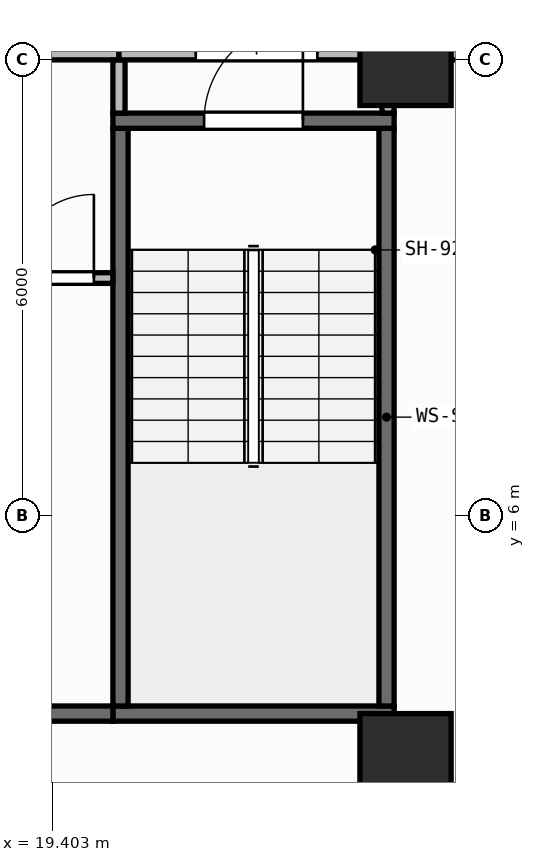
"""IFC4 building model, lengths in metres.
Left out: names, types, materials, properties, quantities, classifications, styles, units other than length and angle.
Written with IfcOpenShell. Run it as: python <this file> out.ifc"""

import sys

from ifc_helpers import new_model, si_unit, direction, frame, frame_2d, origin, origin_2d, place, context, subcontext, project, spatial, rectangle, extrude, element, fill, save


model = new_model("IFC4")
c1 = context("Model", 3, precision=1e-05, world=origin(), true_north=direction((0.0, 1.0)))
c2 = subcontext(c1, "Body", "Model", "MODEL_VIEW")
j1 = project(units=[si_unit("LENGTHUNIT", "METRE"), si_unit("PLANEANGLEUNIT", "RADIAN")], contexts=[c1])
p1 = place(None, origin())
s1 = spatial("IfcSite", under=j1, at=p1, CompositionType="ELEMENT")
p2 = place(p1, origin())
s2 = spatial("IfcBuilding", under=s1, at=p2, CompositionType="ELEMENT")
p3 = place(p2, frame((0.0, 0.0, 146.8)))
s3 = spatial("IfcBuildingStorey", under=s2, at=p3, CompositionType="ELEMENT", Elevation=146.8)
for number, where, z_axis, x_axis in (
    (1, (24.05, 2.8, 0.0), (0.0, 0.0, 1.0), (1.0, 0.0, 0.0)),
    (2, (24.05, 12.0, 0.0), (0.0, 0.0, 1.0), (1.0, 0.0, 0.0)),
):
    element("IfcColumn", number, at=place(p3, frame(where, z_axis=z_axis, x_axis=x_axis)), inside=s3, PredefinedType="COLUMN", context=c2, shape_type="SweptSolid", body=[
        extrude(rectangle(XDim=1.2, YDim=1.2, at=origin_2d()), origin(), (0.0, 0.0, 1.0), 3.95),
    ])
p4 = place(p3, frame((2.76, 0.173, 0.0), z_axis=(0.0, 0.0, 1.0), x_axis=(0.996857931723, 0.079210251617, 0.0)))
e3 = element("IfcWall", 3, at=p4, inside=s3, PredefinedType="STANDARD", context=c2, shape_type="SweptSolid", body=[
    extrude(rectangle(XDim=51.442, YDim=0.26, at=frame_2d((25.721, 0.0))), origin(), (0.0, 0.0, 1.0), 3.71),
])
p5 = place(p4, frame((24.521, 0.0, 0.9)))
e4 = element("IfcOpeningElement", 4, at=p5, cuts=e3, PredefinedType="OPENING", context=c2, shape_type="SweptSolid", body=[
    extrude(rectangle(XDim=2.4, YDim=1.65, at=frame_2d((1.2, 0.825))), frame((0.0, 0.14, 0.0), z_axis=(0.0, -1.0, 0.0), x_axis=(1.0, 0.0, 0.0)), (0.0, 0.0, 1.0), 0.28),
])
p6 = place(p3, frame((20.2, 3.4, 0.0), z_axis=(0.0, 0.0, 1.0), x_axis=(1.0, 0.0, 0.0)))
e5 = element("IfcWall", 5, at=p6, inside=s3, PredefinedType="SHEAR", context=c2, shape_type="SweptSolid", body=[
    extrude(rectangle(XDim=3.7, YDim=0.2, at=frame_2d((1.85, 0.0))), origin(), (0.0, 0.0, 1.0), 3.71),
])
for number, where, z_axis, x_axis in (
    (6, (20.3, 3.5, 0.0), (0.0, 0.0, 1.0), (0.0, 1.0, 0.0)),
    (7, (23.8, 3.5, 0.0), (0.0, 0.0, 1.0), (0.0, 1.0, 0.0)),
):
    element("IfcWall", number, at=place(p3, frame(where, z_axis=z_axis, x_axis=x_axis)), inside=s3, PredefinedType="SHEAR", context=c2, shape_type="SweptSolid", body=[
        extrude(rectangle(XDim=7.6, YDim=0.2, at=frame_2d((3.8, 0.0))), origin(), (0.0, 0.0, 1.0), 3.71),
    ])
p7 = place(p3, frame((20.2, 11.2, 0.0), z_axis=(0.0, 0.0, 1.0), x_axis=(1.0, 0.0, 0.0)))
e8 = element("IfcWall", 8, at=p7, inside=s3, PredefinedType="SHEAR", context=c2, shape_type="SweptSolid", body=[
    extrude(rectangle(XDim=3.7, YDim=0.2, at=frame_2d((1.85, 0.0))), origin(), (0.0, 0.0, 1.0), 3.71),
])
p8 = place(p7, frame((1.2, 0.0, 0.0)))
e9 = element("IfcOpeningElement", 9, at=p8, cuts=e8, PredefinedType="OPENING", context=c2, shape_type="SweptSolid", body=[
    extrude(rectangle(XDim=1.3, YDim=2.15, at=frame_2d((0.65, 1.075))), frame((0.0, 0.11, 0.0), z_axis=(0.0, -1.0, 0.0), x_axis=(1.0, 0.0, 0.0)), (0.0, 0.0, 1.0), 0.22),
])
p9 = place(p3, frame((6.5, 3.4, 0.0), z_axis=(0.0, 0.0, 1.0), x_axis=(1.0, 0.0, 0.0)))
e10 = element("IfcWall", 10, at=p9, inside=s3, PredefinedType="SHEAR", context=c2, shape_type="SweptSolid", body=[
    extrude(rectangle(XDim=13.7, YDim=0.2, at=frame_2d((6.85, 0.0))), origin(), (0.0, 0.0, 1.0), 3.71),
])
p10 = place(p3, frame((18.61, 9.13, 0.0), z_axis=(0.0, 0.0, 1.0), x_axis=(1.0, 0.0, 0.0)))
e11 = element("IfcWall", 11, at=p10, inside=s3, PredefinedType="PARTITIONING", context=c2, shape_type="SweptSolid", body=[
    extrude(rectangle(XDim=1.59, YDim=0.14, at=frame_2d((0.795, 0.0))), origin(), (0.0, 0.0, 1.0), 3.71),
])
p11 = place(p10, frame((0.24, 0.0, 0.0)))
e12 = element("IfcOpeningElement", 12, at=p11, cuts=e11, PredefinedType="OPENING", context=c2, shape_type="SweptSolid", body=[
    extrude(rectangle(XDim=1.1, YDim=2.1, at=frame_2d((0.55, 1.05))), frame((0.0, 0.08, 0.0), z_axis=(0.0, -1.0, 0.0), x_axis=(1.0, 0.0, 0.0)), (0.0, 0.0, 1.0), 0.16),
])
p12 = place(p3, frame((12.58, 12.08, 0.0), z_axis=(0.0, 0.0, 1.0), x_axis=(1.0, 0.0, 0.0)))
e13 = element("IfcWall", 13, at=p12, inside=s3, PredefinedType="PARTITIONING", context=c2, shape_type="SweptSolid", body=[
    extrude(rectangle(XDim=7.7, YDim=0.16, at=frame_2d((3.85, 0.0))), origin(), (0.0, 0.0, 1.0), 3.083),
])
p13 = place(p12, frame((3.05, 0.0, 0.0)))
e14 = element("IfcOpeningElement", 14, at=p13, cuts=e13, PredefinedType="OPENING", context=c2, shape_type="SweptSolid", body=[
    extrude(rectangle(XDim=1.6, YDim=2.05, at=frame_2d((0.8, 1.025))), frame((0.0, 0.09, 0.0), z_axis=(0.0, -1.0, 0.0), x_axis=(1.0, 0.0, 0.0)), (0.0, 0.0, 1.0), 0.18),
])
p14 = place(p3, frame((20.28, 11.3, 0.0), z_axis=(0.0, 0.0, 1.0), x_axis=(0.0, 1.0, 0.0)))
e15 = element("IfcWall", 15, at=p14, inside=s3, PredefinedType="PARTITIONING", context=c2, shape_type="SweptSolid", body=[
    extrude(rectangle(XDim=0.7, YDim=0.16, at=frame_2d((0.35, 0.0))), origin(), (0.0, 0.0, 1.0), 3.71),
])
p15 = place(p3, frame((20.28, 12.08, 0.0), z_axis=(0.0, 0.0, 1.0), x_axis=(1.0, 0.0, 0.0)))
e16 = element("IfcWall", 16, at=p15, inside=s3, PredefinedType="PARTITIONING", context=c2, shape_type="SweptSolid", body=[
    extrude(rectangle(XDim=3.62, YDim=0.16, at=frame_2d((1.81, 0.0))), origin(), (0.0, 0.0, 1.0), 3.083),
])
p16 = place(p15, frame((1.01, 0.0, 0.0)))
e17 = element("IfcOpeningElement", 17, at=p16, cuts=e16, PredefinedType="OPENING", context=c2, shape_type="SweptSolid", body=[
    extrude(rectangle(XDim=1.6, YDim=2.05, at=frame_2d((0.8, 1.025))), frame((0.0, 0.09, 0.0), z_axis=(0.0, -1.0, 0.0), x_axis=(1.0, 0.0, 0.0)), (0.0, 0.0, 1.0), 0.18),
])
p17 = place(p3, frame((23.82, 11.3, 0.0), z_axis=(0.0, 0.0, 1.0), x_axis=(0.0, 1.0, 0.0)))
e18 = element("IfcWall", 18, at=p17, inside=s3, PredefinedType="PARTITIONING", context=c2, shape_type="SweptSolid", body=[
    extrude(rectangle(XDim=0.7, YDim=0.16, at=frame_2d((0.35, 0.0))), origin(), (0.0, 0.0, 1.0), 3.71),
])
p18 = place(p3, frame((24.02, 12.08, 0.0), z_axis=(0.0, 0.0, 1.0), x_axis=(1.0, 0.0, 0.0)))
e19 = element("IfcWall", 19, at=p18, inside=s3, PredefinedType="PARTITIONING", context=c2, shape_type="SweptSolid", body=[
    extrude(rectangle(XDim=1.244, YDim=0.16, at=frame_2d((0.622, 0.0))), origin(), (0.0, 0.0, 1.0), 3.083),
])
p19 = place(p8, origin())
e20 = element("IfcDoor", 20, at=p19, inside=s3, OperationType="SINGLE_SWING_RIGHT", PredefinedType="DOOR", context=c2, shape_type="SweptSolid", body=[
    extrude(rectangle(XDim=1.3, YDim=2.15, at=frame_2d((0.65, 1.075))), frame((0.0, 0.025, 0.0), z_axis=(0.0, -1.0, 0.0), x_axis=(1.0, 0.0, 0.0)), (0.0, 0.0, 1.0), 0.05),
])
fill(e9, e20)
p20 = place(p11, origin())
e21 = element("IfcDoor", 21, at=p20, inside=s3, OperationType="SINGLE_SWING_RIGHT", PredefinedType="DOOR", context=c2, shape_type="SweptSolid", body=[
    extrude(rectangle(XDim=1.1, YDim=2.1, at=frame_2d((0.55, 1.05))), frame((0.0, 0.025, 0.0), z_axis=(0.0, -1.0, 0.0), x_axis=(1.0, 0.0, 0.0)), (0.0, 0.0, 1.0), 0.05),
])
fill(e12, e21)
p21 = place(p16, origin())
e22 = element("IfcDoor", 22, at=p21, inside=s3, OperationType="DOUBLE_DOOR_SINGLE_SWING", PredefinedType="DOOR", context=c2, shape_type="SweptSolid", body=[
    extrude(rectangle(XDim=1.6, YDim=2.05, at=frame_2d((0.8, 1.025))), frame((0.0, 0.025, 0.0), z_axis=(0.0, -1.0, 0.0), x_axis=(1.0, 0.0, 0.0)), (0.0, 0.0, 1.0), 0.05),
])
fill(e17, e22)
save(model, sys.argv[1])
